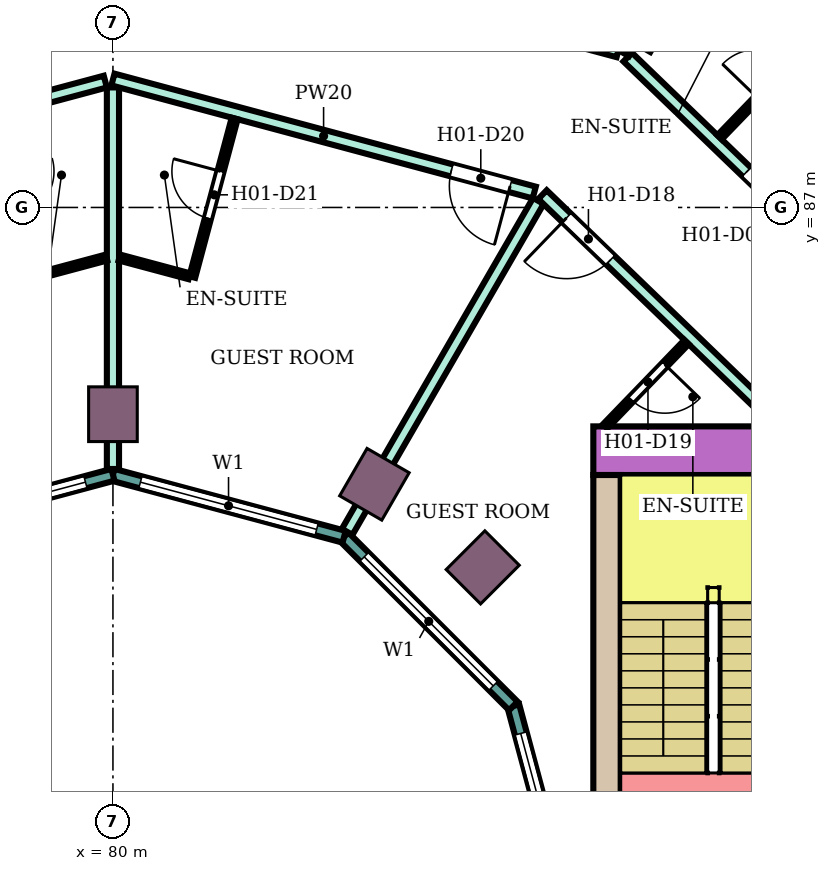
"""IFC4 building model, lengths in metres.
Left out: names, types, materials, properties, quantities, classifications, styles, units other than length and angle.
Written with IfcOpenShell. Run it as: python <this file> out.ifc"""

import sys

from ifc_helpers import new_model, si_unit, direction, frame, frame_2d, origin, origin_2d, place, context, subcontext, project, spatial, rectangle, extrude, element, fill, save


model = new_model("IFC4")
c1 = context("Model", 3, precision=1e-05, world=origin(), true_north=direction((0.0, 1.0)))
c2 = subcontext(c1, "Body", "Model", "MODEL_VIEW")
j1 = project(units=[si_unit("LENGTHUNIT", "METRE"), si_unit("PLANEANGLEUNIT", "RADIAN")], contexts=[c1])
p1 = place(None, origin())
s1 = spatial("IfcSite", under=j1, at=p1, CompositionType="ELEMENT")
p2 = place(p1, origin())
s2 = spatial("IfcBuilding", under=s1, at=p2, CompositionType="ELEMENT")
p3 = place(p2, frame((0.0, 0.0, 28.8)))
s3 = spatial("IfcBuildingStorey", under=s2, at=p3, CompositionType="ELEMENT", Elevation=28.8)
p4 = place(p3, frame((88.8, 90.242, 0.0), z_axis=(0.0, 0.0, 1.0), x_axis=(0.5, 0.866025403784, 0.0)))
e1 = element("IfcColumn", 1, at=p4, inside=s3, PredefinedType="COLUMN", context=c2, shape_type="SweptSolid", body=[
    extrude(rectangle(XDim=1.2, YDim=0.8, at=origin_2d()), origin(), (0.0, 0.0, 1.0), 3.8),
])
for number, where, z_axis, x_axis in (
    (2, (86.081, 81.081, 0.0), (0.0, 0.0, 1.0), (0.707, 0.707, 0.0)),
    (3, (84.3, 82.448, 0.0), (0.0, 0.0, 1.0), (0.5, 0.866, 0.0)),
    (4, (80.0, 83.6, 0.0), (0.0, 0.0, 1.0), (0.0, 1.0, 0.0)),
):
    element("IfcColumn", number, at=place(p3, frame(where, z_axis=z_axis, x_axis=x_axis)), inside=s3, PredefinedType="COLUMN", context=c2, shape_type="SweptSolid", body=[
        extrude(rectangle(XDim=0.9, YDim=0.8, at=origin_2d()), origin(), (0.0, 0.0, 1.0), 3.8),
    ])
p5 = place(p3, frame((87.9, 83.0, 0.0), z_axis=(0.0, 0.0, 1.0), x_axis=(1.0, 0.0, 0.0)))
e5 = element("IfcWall", 5, at=p5, inside=s3, PredefinedType="SHEAR", context=c2, shape_type="SweptSolid", body=[
    extrude(rectangle(XDim=14.7, YDim=0.8, at=frame_2d((7.35, 0.0))), origin(), (0.0, 0.0, 1.0), 3.48),
])
p6 = place(p5, frame((4.2, 0.0, 0.0)))
e6 = element("IfcOpeningElement", 6, at=p6, cuts=e5, PredefinedType="OPENING", context=c2, shape_type="SweptSolid", body=[
    extrude(rectangle(XDim=2.4, YDim=2.4, at=frame_2d((1.2, 1.2))), frame((0.0, 0.41, 0.0), z_axis=(0.0, -1.0, 0.0), x_axis=(1.0, 0.0, 0.0)), (0.0, 0.0, 1.0), 0.82),
])
p7 = place(p3, frame((88.125, 75.0, 0.0), z_axis=(0.0, 0.0, 1.0), x_axis=(0.0, 1.0, 0.0)))
e7 = element("IfcWall", 7, at=p7, inside=s3, PredefinedType="SHEAR", context=c2, shape_type="SweptSolid", body=[
    extrude(rectangle(XDim=7.6, YDim=0.45, at=frame_2d((3.8, 0.0))), origin(), (0.0, 0.0, 1.0), 3.48),
])
p8 = place(p3, frame((87.604, 75.0, 0.0), z_axis=(0.0, 0.0, 1.0), x_axis=(-0.258789828301, 0.965933654434, 0.0)))
e8 = element("IfcWall", 8, at=p8, inside=s3, PredefinedType="NOTDEFINED", context=c2, shape_type="SweptSolid", body=[
    extrude(rectangle(XDim=3.936, YDim=0.2, at=frame_2d((1.968, 0.0))), origin(), (0.0, 0.0, 1.0), 3.8),
])
p9 = place(p8, frame((0.468, 0.0, 0.9)))
e9 = element("IfcOpeningElement", 9, at=p9, cuts=e8, PredefinedType="OPENING", context=c2, shape_type="SweptSolid", body=[
    extrude(rectangle(XDim=3.0, YDim=2.3, at=frame_2d((1.5, 1.15))), frame((0.0, 0.11, 0.0), z_axis=(0.0, -1.0, 0.0), x_axis=(1.0, 0.0, 0.0)), (0.0, 0.0, 1.0), 0.22),
])
p10 = place(p3, frame((86.585, 78.802, 0.0), z_axis=(0.0, 0.0, 1.0), x_axis=(-0.707106781187, 0.707106781187, 0.0)))
e10 = element("IfcWall", 10, at=p10, inside=s3, PredefinedType="NOTDEFINED", context=c2, shape_type="SweptSolid", body=[
    extrude(rectangle(XDim=3.936, YDim=0.2, at=frame_2d((1.968, 0.0))), origin(), (0.0, 0.0, 1.0), 3.8),
])
p11 = place(p10, frame((0.468, 0.0, 0.9)))
e11 = element("IfcOpeningElement", 11, at=p11, cuts=e10, PredefinedType="OPENING", context=c2, shape_type="SweptSolid", body=[
    extrude(rectangle(XDim=3.0, YDim=2.3, at=frame_2d((1.5, 1.15))), frame((0.0, 0.11, 0.0), z_axis=(0.0, -1.0, 0.0), x_axis=(1.0, 0.0, 0.0)), (0.0, 0.0, 1.0), 0.22),
])
p12 = place(p3, frame((83.802, 81.585, 0.0), z_axis=(0.0, 0.0, 1.0), x_axis=(-0.965933654434, 0.258789828301, 0.0)))
e12 = element("IfcWall", 12, at=p12, inside=s3, PredefinedType="NOTDEFINED", context=c2, shape_type="SweptSolid", body=[
    extrude(rectangle(XDim=3.936, YDim=0.2, at=frame_2d((1.968, 0.0))), origin(), (0.0, 0.0, 1.0), 3.8),
])
p13 = place(p12, frame((0.468, 0.0, 0.9)))
e13 = element("IfcOpeningElement", 13, at=p13, cuts=e12, PredefinedType="OPENING", context=c2, shape_type="SweptSolid", body=[
    extrude(rectangle(XDim=3.0, YDim=2.3, at=frame_2d((1.5, 1.15))), frame((0.0, 0.11, 0.0), z_axis=(0.0, -1.0, 0.0), x_axis=(1.0, 0.0, 0.0)), (0.0, 0.0, 1.0), 0.22),
])
p14 = place(p3, frame((80.0, 82.604, 0.0), z_axis=(0.0, 0.0, 1.0), x_axis=(-0.965933654434, -0.258789828301, 0.0)))
e14 = element("IfcWall", 14, at=p14, inside=s3, PredefinedType="NOTDEFINED", context=c2, shape_type="SweptSolid", body=[
    extrude(rectangle(XDim=3.936, YDim=0.2, at=frame_2d((1.968, 0.0))), origin(), (0.0, 0.0, 1.0), 3.8),
])
p15 = place(p14, frame((0.468, 0.0, 0.9)))
e15 = element("IfcOpeningElement", 15, at=p15, cuts=e14, PredefinedType="OPENING", context=c2, shape_type="SweptSolid", body=[
    extrude(rectangle(XDim=3.0, YDim=2.3, at=frame_2d((1.5, 1.15))), frame((0.0, 0.11, 0.0), z_axis=(0.0, -1.0, 0.0), x_axis=(1.0, 0.0, 0.0)), (0.0, 0.0, 1.0), 0.22),
])
p16 = place(p3, frame((71.614, 89.55, 0.0), z_axis=(0.0, 0.0, 1.0), x_axis=(0.965982156828, 0.258608725086, 0.0)))
e16 = element("IfcWall", 16, at=p16, inside=s3, PredefinedType="PARTITIONING", context=c2, shape_type="SweptSolid", body=[
    extrude(rectangle(XDim=8.592, YDim=0.2, at=frame_2d((4.296, 0.0))), origin(), (0.0, 0.0, 1.0), 3.35),
])
p17 = place(p16, frame((4.865, 0.0, 0.0)))
e17 = element("IfcOpeningElement", 17, at=p17, cuts=e16, PredefinedType="OPENING", context=c2, shape_type="SweptSolid", body=[
    extrude(rectangle(XDim=1.0, YDim=2.1, at=frame_2d((0.5, 1.05))), frame((0.0, 0.11, 0.0), z_axis=(0.0, -1.0, 0.0), x_axis=(1.0, 0.0, 0.0)), (0.0, 0.0, 1.0), 0.22),
])
p18 = place(p16, frame((2.804, 0.0, 0.0)))
e18 = element("IfcOpeningElement", 18, at=p18, cuts=e16, PredefinedType="OPENING", context=c2, shape_type="SweptSolid", body=[
    extrude(rectangle(XDim=1.0, YDim=2.1, at=frame_2d((0.5, 1.05))), frame((0.0, 0.11, 0.0), z_axis=(0.0, -1.0, 0.0), x_axis=(1.0, 0.0, 0.0)), (0.0, 0.0, 1.0), 0.22),
])
p19 = place(p3, frame((73.071, 87.247, 0.0), z_axis=(0.0, 0.0, 1.0), x_axis=(0.965931651205, 0.258797305243, 0.0)))
e19 = element("IfcWall", 19, at=p19, inside=s3, PredefinedType="PARTITIONING", context=c2, shape_type="SweptSolid", body=[
    extrude(rectangle(XDim=7.043, YDim=0.2, at=frame_2d((3.521, 0.0))), origin(), (0.0, 0.0, 1.0), 3.35),
])
p20 = place(p19, frame((0.41, 0.0, 0.0)))
e20 = element("IfcOpeningElement", 20, at=p20, cuts=e19, PredefinedType="OPENING", context=c2, shape_type="SweptSolid", body=[
    extrude(rectangle(XDim=1.0, YDim=2.1, at=frame_2d((0.5, 1.05))), frame((0.0, 0.11, 0.0), z_axis=(0.0, -1.0, 0.0), x_axis=(1.0, 0.0, 0.0)), (0.0, 0.0, 1.0), 0.22),
])
p21 = place(p3, frame((80.0, 82.699, 0.0), z_axis=(0.0, 0.0, 1.0), x_axis=(0.0, 1.0, 0.0)))
e21 = element("IfcWall", 21, at=p21, inside=s3, PredefinedType="PARTITIONING", context=c2, shape_type="SweptSolid", body=[
    extrude(rectangle(XDim=6.275, YDim=0.2, at=frame_2d((3.138, 0.0))), origin(), (0.0, 0.0, 1.0), 3.35),
])
p22 = place(p3, frame((80.0, 89.104, 0.0), z_axis=(0.0, 0.0, 1.0), x_axis=(0.965856548257, -0.259077455964, 0.0)))
e22 = element("IfcWall", 22, at=p22, inside=s3, PredefinedType="PARTITIONING", context=c2, shape_type="SweptSolid", body=[
    extrude(rectangle(XDim=7.173, YDim=0.2, at=frame_2d((3.586, 0.0))), origin(), (0.0, 0.0, 1.0), 3.35),
])
p23 = place(p22, frame((5.763, 0.0, 0.0)))
e23 = element("IfcOpeningElement", 23, at=p23, cuts=e22, PredefinedType="OPENING", context=c2, shape_type="SweptSolid", body=[
    extrude(rectangle(XDim=1.0, YDim=2.1, at=frame_2d((0.5, 1.05))), frame((0.0, 0.11, 0.0), z_axis=(0.0, -1.0, 0.0), x_axis=(1.0, 0.0, 0.0)), (0.0, 0.0, 1.0), 0.22),
])
p24 = place(p3, frame((80.0, 91.797, 0.0), z_axis=(0.0, 0.0, 1.0), x_axis=(0.965857042792, -0.259075612301, 0.0)))
e24 = element("IfcWall", 24, at=p24, inside=s3, PredefinedType="PARTITIONING", context=c2, shape_type="SweptSolid", body=[
    extrude(rectangle(XDim=8.602, YDim=0.2, at=frame_2d((4.301, 0.0))), origin(), (0.0, 0.0, 1.0), 3.35),
])
p25 = place(p24, frame((4.877, 0.0, 0.0)))
e25 = element("IfcOpeningElement", 25, at=p25, cuts=e24, PredefinedType="OPENING", context=c2, shape_type="SweptSolid", body=[
    extrude(rectangle(XDim=1.0, YDim=2.1, at=frame_2d((0.5, 1.05))), frame((0.0, 0.11, 0.0), z_axis=(0.0, -1.0, 0.0), x_axis=(1.0, 0.0, 0.0)), (0.0, 0.0, 1.0), 0.22),
])
p26 = place(p24, frame((2.73, 0.0, 0.0)))
e26 = element("IfcOpeningElement", 26, at=p26, cuts=e24, PredefinedType="OPENING", context=c2, shape_type="SweptSolid", body=[
    extrude(rectangle(XDim=1.1, YDim=2.1, at=frame_2d((0.55, 1.05))), frame((0.0, 0.11, 0.0), z_axis=(0.0, -1.0, 0.0), x_axis=(1.0, 0.0, 0.0)), (0.0, 0.0, 1.0), 0.22),
])
p27 = place(p3, frame((83.852, 81.665, 0.0), z_axis=(0.0, 0.0, 1.0), x_axis=(0.500253653624, 0.865878907259, 0.0)))
e27 = element("IfcWall", 27, at=p27, inside=s3, PredefinedType="PARTITIONING", context=c2, shape_type="SweptSolid", body=[
    extrude(rectangle(XDim=6.285, YDim=0.2, at=frame_2d((3.143, 0.0))), origin(), (0.0, 0.0, 1.0), 3.35),
])
p28 = place(p3, frame((87.064, 87.211, 0.0), z_axis=(0.0, 0.0, 1.0), x_axis=(0.719540958932, -0.694450004262, 0.0)))
e28 = element("IfcWall", 28, at=p28, inside=s3, PredefinedType="PARTITIONING", context=c2, shape_type="SweptSolid", body=[
    extrude(rectangle(XDim=5.488, YDim=0.2, at=frame_2d((2.744, 0.0))), origin(), (0.0, 0.0, 1.0), 3.35),
])
p29 = place(p28, frame((0.55, 0.0, 0.0)))
e29 = element("IfcOpeningElement", 29, at=p29, cuts=e28, PredefinedType="OPENING", context=c2, shape_type="SweptSolid", body=[
    extrude(rectangle(XDim=1.0, YDim=2.1, at=frame_2d((0.5, 1.05))), frame((0.0, 0.11, 0.0), z_axis=(0.0, -1.0, 0.0), x_axis=(1.0, 0.0, 0.0)), (0.0, 0.0, 1.0), 0.22),
])
p30 = place(p3, frame((88.465, 89.473, 0.0), z_axis=(0.0, 0.0, 1.0), x_axis=(0.719457552421, -0.694536413922, 0.0)))
e30 = element("IfcWall", 30, at=p30, inside=s3, PredefinedType="PARTITIONING", context=c2, shape_type="SweptSolid", body=[
    extrude(rectangle(XDim=6.524, YDim=0.2, at=frame_2d((3.262, 0.0))), origin(), (0.0, 0.0, 1.0), 3.35),
])
p31 = place(p30, frame((2.719, 0.0, 0.0)))
e31 = element("IfcOpeningElement", 31, at=p31, cuts=e30, PredefinedType="OPENING", context=c2, shape_type="SweptSolid", body=[
    extrude(rectangle(XDim=1.0, YDim=2.1, at=frame_2d((0.5, 1.05))), frame((0.0, 0.11, 0.0), z_axis=(0.0, -1.0, 0.0), x_axis=(1.0, 0.0, 0.0)), (0.0, 0.0, 1.0), 0.22),
])
p32 = place(p3, frame((88.4, 89.538, 0.0), z_axis=(0.0, 0.0, 1.0), x_axis=(0.5002401188, 0.865886726739, 0.0)))
e32 = element("IfcWall", 32, at=p32, inside=s3, PredefinedType="PARTITIONING", context=c2, shape_type="SweptSolid", body=[
    extrude(rectangle(XDim=9.008, YDim=0.2, at=frame_2d((4.504, 0.0))), origin(), (0.0, 0.0, 1.0), 3.35),
])
p33 = place(p3, frame((78.696, 85.856, 0.0), z_axis=(0.0, 0.0, 1.0), x_axis=(0.966002513606, 0.258532674351, 0.0)))
e33 = element("IfcWall", 33, at=p33, inside=s3, PredefinedType="PARTITIONING", context=c2, shape_type="SweptSolid", body=[
    extrude(rectangle(XDim=1.24, YDim=0.1, at=frame_2d((0.62, 0.0))), origin(), (0.0, 0.0, 1.0), 3.35),
])
p34 = place(p3, frame((80.106, 86.177, 0.0), z_axis=(0.0, 0.0, 1.0), x_axis=(0.966002973184, -0.258530957139, 0.0)))
e34 = element("IfcWall", 34, at=p34, inside=s3, PredefinedType="PARTITIONING", context=c2, shape_type="SweptSolid", body=[
    extrude(rectangle(XDim=1.19, YDim=0.1, at=frame_2d((0.595, 0.0))), origin(), (0.0, 0.0, 1.0), 3.35),
])
p35 = place(p3, frame((81.304, 85.856, 0.0), z_axis=(0.0, 0.0, 1.0), x_axis=(0.25867580527, 0.965964195904, 0.0)))
e35 = element("IfcWall", 35, at=p35, inside=s3, PredefinedType="PARTITIONING", context=c2, shape_type="SweptSolid", body=[
    extrude(rectangle(XDim=2.699, YDim=0.1, at=frame_2d((1.35, 0.0))), origin(), (0.0, 0.0, 1.0), 3.35),
])
p36 = place(p35, frame((1.0, 0.0, 0.0)))
e36 = element("IfcOpeningElement", 36, at=p36, cuts=e35, PredefinedType="OPENING", context=c2, shape_type="SweptSolid", body=[
    extrude(rectangle(XDim=0.8, YDim=2.1, at=frame_2d((0.4, 1.05))), frame((0.0, 0.06, 0.0), z_axis=(0.0, -1.0, 0.0), x_axis=(1.0, 0.0, 0.0)), (0.0, 0.0, 1.0), 0.12),
])
p37 = place(p3, frame((88.095, 83.4, 0.0), z_axis=(0.0, 0.0, 1.0), x_axis=(0.694447472534, 0.719543402368, 0.0)))
e37 = element("IfcWall", 37, at=p37, inside=s3, PredefinedType="PARTITIONING", context=c2, shape_type="SweptSolid", body=[
    extrude(rectangle(XDim=1.926, YDim=0.1, at=frame_2d((0.963, 0.0))), origin(), (0.0, 0.0, 1.0), 3.35),
])
p38 = place(p37, frame((0.613, 0.0, 0.0)))
e38 = element("IfcOpeningElement", 38, at=p38, cuts=e37, PredefinedType="OPENING", context=c2, shape_type="SweptSolid", body=[
    extrude(rectangle(XDim=0.8, YDim=2.1, at=frame_2d((0.4, 1.05))), frame((0.0, 0.06, 0.0), z_axis=(0.0, -1.0, 0.0), x_axis=(1.0, 0.0, 0.0)), (0.0, 0.0, 1.0), 0.12),
])
p39 = place(p3, frame((89.976, 88.154, 0.0), z_axis=(0.0, 0.0, 1.0), x_axis=(0.6945137956, 0.719479386585, 0.0)))
e39 = element("IfcWall", 39, at=p39, inside=s3, PredefinedType="PARTITIONING", context=c2, shape_type="SweptSolid", body=[
    extrude(rectangle(XDim=2.699, YDim=0.1, at=frame_2d((1.35, 0.0))), origin(), (0.0, 0.0, 1.0), 3.35),
])
p40 = place(p39, frame((0.9, 0.0, 0.0)))
e40 = element("IfcOpeningElement", 40, at=p40, cuts=e39, PredefinedType="OPENING", context=c2, shape_type="SweptSolid", body=[
    extrude(rectangle(XDim=0.8, YDim=2.1, at=frame_2d((0.4, 1.05))), frame((0.0, 0.06, 0.0), z_axis=(0.0, -1.0, 0.0), x_axis=(1.0, 0.0, 0.0)), (0.0, 0.0, 1.0), 0.12),
])
p41 = place(p9, origin())
e41 = element("IfcWindow", 41, at=p41, inside=s3, PartitioningType="SINGLE_PANEL", PredefinedType="WINDOW", context=c2, shape_type="SweptSolid", body=[
    extrude(rectangle(XDim=3.0, YDim=2.3, at=frame_2d((1.5, 1.15))), frame((0.0, 0.03, 0.0), z_axis=(0.0, -1.0, 0.0), x_axis=(1.0, 0.0, 0.0)), (0.0, 0.0, 1.0), 0.06),
])
fill(e9, e41)
p42 = place(p11, origin())
e42 = element("IfcWindow", 42, at=p42, inside=s3, PartitioningType="SINGLE_PANEL", PredefinedType="WINDOW", context=c2, shape_type="SweptSolid", body=[
    extrude(rectangle(XDim=3.0, YDim=2.3, at=frame_2d((1.5, 1.15))), frame((0.0, 0.03, 0.0), z_axis=(0.0, -1.0, 0.0), x_axis=(1.0, 0.0, 0.0)), (0.0, 0.0, 1.0), 0.06),
])
fill(e11, e42)
p43 = place(p13, origin())
e43 = element("IfcWindow", 43, at=p43, inside=s3, PartitioningType="SINGLE_PANEL", PredefinedType="WINDOW", context=c2, shape_type="SweptSolid", body=[
    extrude(rectangle(XDim=3.0, YDim=2.3, at=frame_2d((1.5, 1.15))), frame((0.0, 0.03, 0.0), z_axis=(0.0, -1.0, 0.0), x_axis=(1.0, 0.0, 0.0)), (0.0, 0.0, 1.0), 0.06),
])
fill(e13, e43)
p44 = place(p15, origin())
e44 = element("IfcWindow", 44, at=p44, inside=s3, PartitioningType="SINGLE_PANEL", PredefinedType="WINDOW", context=c2, shape_type="SweptSolid", body=[
    extrude(rectangle(XDim=3.0, YDim=2.3, at=frame_2d((1.5, 1.15))), frame((0.0, 0.03, 0.0), z_axis=(0.0, -1.0, 0.0), x_axis=(1.0, 0.0, 0.0)), (0.0, 0.0, 1.0), 0.06),
])
fill(e15, e44)
p45 = place(p31, origin())
e45 = element("IfcDoor", 45, at=p45, inside=s3, OperationType="SINGLE_SWING_RIGHT", PredefinedType="DOOR", context=c2, shape_type="SweptSolid", body=[
    extrude(rectangle(XDim=1.0, YDim=2.1, at=frame_2d((0.5, 1.05))), frame((0.0, 0.025, 0.0), z_axis=(0.0, -1.0, 0.0), x_axis=(1.0, 0.0, 0.0)), (0.0, 0.0, 1.0), 0.05),
])
fill(e31, e45)
p46 = place(p29, frame((1.0, 0.0, 0.0), z_axis=(0.0, 0.0, 1.0), x_axis=(-1.0, 0.0, 0.0)))
e46 = element("IfcDoor", 46, at=p46, inside=s3, OperationType="SINGLE_SWING_RIGHT", PredefinedType="DOOR", context=c2, shape_type="SweptSolid", body=[
    extrude(rectangle(XDim=1.0, YDim=2.1, at=frame_2d((0.5, 1.05))), frame((0.0, 0.025, 0.0), z_axis=(0.0, -1.0, 0.0), x_axis=(1.0, 0.0, 0.0)), (0.0, 0.0, 1.0), 0.05),
])
fill(e29, e46)
p47 = place(p38, frame((0.8, 0.0, 0.0), z_axis=(0.0, 0.0, 1.0), x_axis=(-1.0, 0.0, 0.0)))
e47 = element("IfcDoor", 47, at=p47, inside=s3, OperationType="SINGLE_SWING_LEFT", PredefinedType="DOOR", context=c2, shape_type="SweptSolid", body=[
    extrude(rectangle(XDim=0.8, YDim=2.1, at=frame_2d((0.4, 1.05))), frame((0.0, 0.025, 0.0), z_axis=(0.0, -1.0, 0.0), x_axis=(1.0, 0.0, 0.0)), (0.0, 0.0, 1.0), 0.05),
])
fill(e38, e47)
p48 = place(p23, frame((1.0, 0.0, 0.0), z_axis=(0.0, 0.0, 1.0), x_axis=(-1.0, 0.0, 0.0)))
e48 = element("IfcDoor", 48, at=p48, inside=s3, OperationType="SINGLE_SWING_LEFT", PredefinedType="DOOR", context=c2, shape_type="SweptSolid", body=[
    extrude(rectangle(XDim=1.0, YDim=2.1, at=frame_2d((0.5, 1.05))), frame((0.0, 0.025, 0.0), z_axis=(0.0, -1.0, 0.0), x_axis=(1.0, 0.0, 0.0)), (0.0, 0.0, 1.0), 0.05),
])
fill(e23, e48)
p49 = place(p36, origin())
e49 = element("IfcDoor", 49, at=p49, inside=s3, OperationType="SINGLE_SWING_RIGHT", PredefinedType="DOOR", context=c2, shape_type="SweptSolid", body=[
    extrude(rectangle(XDim=0.8, YDim=2.1, at=frame_2d((0.4, 1.05))), frame((0.0, 0.025, 0.0), z_axis=(0.0, -1.0, 0.0), x_axis=(1.0, 0.0, 0.0)), (0.0, 0.0, 1.0), 0.05),
])
fill(e36, e49)
save(model, sys.argv[1])
